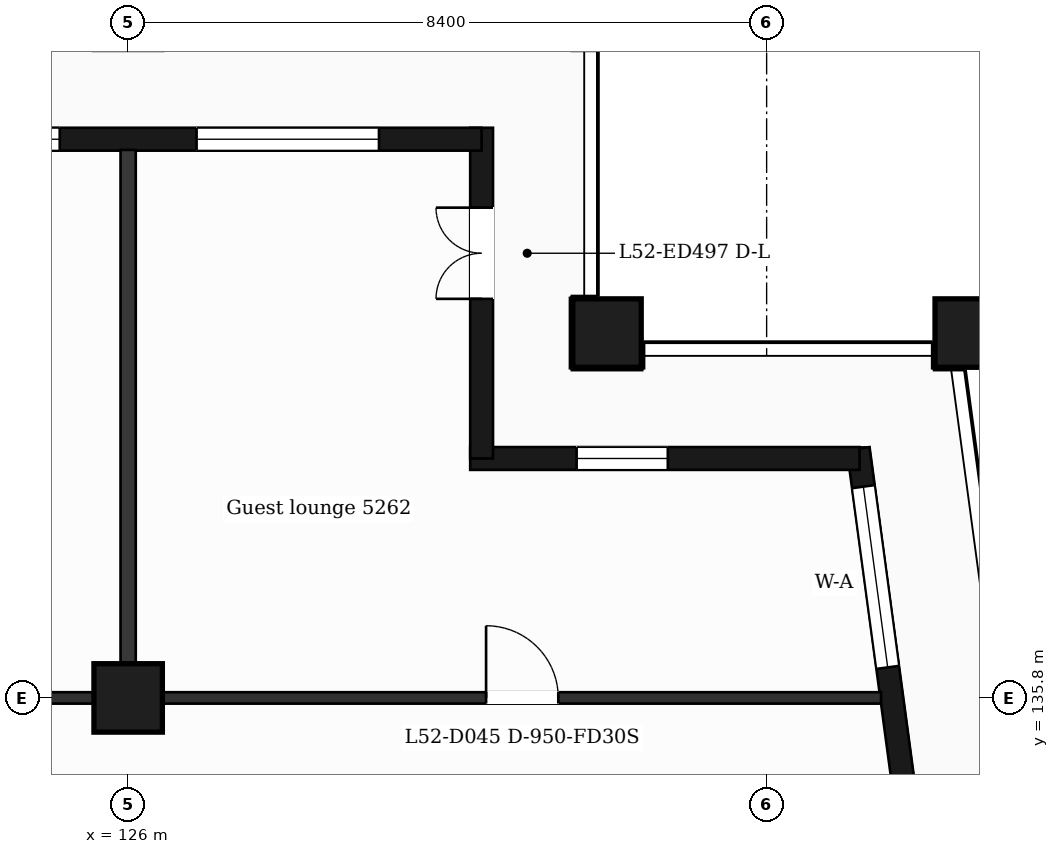
"""IFC4 building model, lengths in metres.
Left out: names, types, materials, properties, quantities, classifications, styles, units other than length and angle.
Written with IfcOpenShell. Run it as: python <this file> out.ifc"""

import sys

from ifc_helpers import new_model, si_unit, direction, frame, frame_2d, origin, origin_2d, place, context, subcontext, project, spatial, rectangle, extrude, element, fill, save


model = new_model("IFC4")
c1 = context("Model", 3, precision=1e-05, world=origin(), true_north=direction((0.0, 1.0)))
c2 = subcontext(c1, "Body", "Model", "MODEL_VIEW")
j1 = project(units=[si_unit("LENGTHUNIT", "METRE"), si_unit("PLANEANGLEUNIT", "RADIAN")], contexts=[c1])
p1 = place(None, origin())
s1 = spatial("IfcSite", under=j1, at=p1, CompositionType="ELEMENT")
p2 = place(p1, origin())
s2 = spatial("IfcBuilding", under=s1, at=p2, CompositionType="ELEMENT")
p3 = place(p2, frame((0.0, 0.0, 217.0)))
s3 = spatial("IfcBuildingStorey", under=s2, at=p3, CompositionType="ELEMENT", Elevation=217.0)
for number, where, z_axis, x_axis in (
    (1, (132.3, 140.6, 0.0), (0.0, 0.0, 1.0), (1.0, 0.0, 0.0)),
    (2, (137.065, 140.6, 0.0), (0.0, 0.0, 1.0), (1.0, 0.0, 0.0)),
    (3, (126.0, 135.8, 0.0), (0.0, 0.0, 1.0), (1.0, 0.0, 0.0)),
):
    element("IfcColumn", number, at=place(p3, frame(where, z_axis=z_axis, x_axis=x_axis)), inside=s3, PredefinedType="COLUMN", context=c2, shape_type="SweptSolid", body=[
        extrude(rectangle(XDim=0.9, YDim=0.9, at=origin_2d()), origin(), (0.0, 0.0, 1.0), 3.7),
    ])
p4 = place(p3, frame((136.504, 132.4, 0.0), z_axis=(0.0, 0.0, 1.0), x_axis=(-0.133399697462, 0.99106231929, 0.0)))
e4 = element("IfcWall", 4, at=p4, inside=s3, PredefinedType="SOLIDWALL", context=c2, shape_type="SweptSolid", body=[
    extrude(rectangle(XDim=6.74, YDim=0.3, at=frame_2d((3.37, 0.0))), origin(), (0.0, 0.0, 1.0), 3.38),
])
p5 = place(p4, frame((1.115, 0.0, 0.0)))
e5 = element("IfcOpeningElement", 5, at=p5, cuts=e4, PredefinedType="OPENING", context=c2, shape_type="SweptSolid", body=[
    extrude(rectangle(XDim=1.2, YDim=2.4, at=frame_2d((0.6, 1.2))), frame((0.0, 0.16, 0.0), z_axis=(0.0, -1.0, 0.0), x_axis=(1.0, 0.0, 0.0)), (0.0, 0.0, 1.0), 0.32),
])
p6 = place(p4, frame((3.835, 0.0, 0.9)))
e6 = element("IfcOpeningElement", 6, at=p6, cuts=e4, PredefinedType="OPENING", context=c2, shape_type="SweptSolid", body=[
    extrude(rectangle(XDim=2.4, YDim=2.1, at=frame_2d((1.2, 1.05))), frame((0.0, 0.16, 0.0), z_axis=(0.0, -1.0, 0.0), x_axis=(1.0, 0.0, 0.0)), (0.0, 0.0, 1.0), 0.32),
])
p7 = place(p3, frame((135.623, 138.95, 0.0), z_axis=(0.0, 0.0, 1.0), x_axis=(-1.0, 0.0, 0.0)))
e7 = element("IfcWall", 7, at=p7, inside=s3, PredefinedType="SOLIDWALL", context=c2, shape_type="SweptSolid", body=[
    extrude(rectangle(XDim=5.123, YDim=0.3, at=frame_2d((2.561, 0.0))), origin(), (0.0, 0.0, 1.0), 3.38),
])
p8 = place(p7, frame((2.523, 0.0, 0.9)))
e8 = element("IfcOpeningElement", 8, at=p8, cuts=e7, PredefinedType="OPENING", context=c2, shape_type="SweptSolid", body=[
    extrude(rectangle(XDim=1.2, YDim=2.1, at=frame_2d((0.6, 1.05))), frame((0.0, 0.16, 0.0), z_axis=(0.0, -1.0, 0.0), x_axis=(1.0, 0.0, 0.0)), (0.0, 0.0, 1.0), 0.32),
])
p9 = place(p3, frame((130.65, 138.95, 0.0), z_axis=(0.0, 0.0, 1.0), x_axis=(0.0, 1.0, 0.0)))
e9 = element("IfcWall", 9, at=p9, inside=s3, PredefinedType="SOLIDWALL", context=c2, shape_type="SweptSolid", body=[
    extrude(rectangle(XDim=4.35, YDim=0.3, at=frame_2d((2.175, 0.0))), origin(), (0.0, 0.0, 1.0), 3.38),
])
p10 = place(p9, frame((2.1, 0.0, 0.0)))
e10 = element("IfcOpeningElement", 10, at=p10, cuts=e9, PredefinedType="OPENING", context=c2, shape_type="SweptSolid", body=[
    extrude(rectangle(XDim=1.2, YDim=2.4, at=frame_2d((0.6, 1.2))), frame((0.0, 0.16, 0.0), z_axis=(0.0, -1.0, 0.0), x_axis=(1.0, 0.0, 0.0)), (0.0, 0.0, 1.0), 0.32),
])
p11 = place(p3, frame((130.65, 143.15, 0.0), z_axis=(0.0, 0.0, 1.0), x_axis=(-1.0, 0.0, 0.0)))
e11 = element("IfcWall", 11, at=p11, inside=s3, PredefinedType="SOLIDWALL", context=c2, shape_type="SweptSolid", body=[
    extrude(rectangle(XDim=16.35, YDim=0.3, at=frame_2d((8.175, 0.0))), origin(), (0.0, 0.0, 1.0), 3.38),
])
p12 = place(p11, frame((1.35, 0.0, 0.9)))
e12 = element("IfcOpeningElement", 12, at=p12, cuts=e11, PredefinedType="OPENING", context=c2, shape_type="SweptSolid", body=[
    extrude(rectangle(XDim=2.4, YDim=2.1, at=frame_2d((1.2, 1.05))), frame((0.0, 0.16, 0.0), z_axis=(0.0, -1.0, 0.0), x_axis=(1.0, 0.0, 0.0)), (0.0, 0.0, 1.0), 0.32),
])
p13 = place(p11, frame((5.55, 0.0, 0.9)))
e13 = element("IfcOpeningElement", 13, at=p13, cuts=e11, PredefinedType="OPENING", context=c2, shape_type="SweptSolid", body=[
    extrude(rectangle(XDim=2.4, YDim=2.1, at=frame_2d((1.2, 1.05))), frame((0.0, 0.16, 0.0), z_axis=(0.0, -1.0, 0.0), x_axis=(1.0, 0.0, 0.0)), (0.0, 0.0, 1.0), 0.32),
])
p14 = place(p11, frame((9.45, 0.0, 0.0)))
e14 = element("IfcOpeningElement", 14, at=p14, cuts=e11, PredefinedType="OPENING", context=c2, shape_type="SweptSolid", body=[
    extrude(rectangle(XDim=1.2, YDim=2.4, at=frame_2d((0.6, 1.2))), frame((0.0, 0.16, 0.0), z_axis=(0.0, -1.0, 0.0), x_axis=(1.0, 0.0, 0.0)), (0.0, 0.0, 1.0), 0.32),
])
p15 = place(p11, frame((11.25, 0.0, 0.9)))
e15 = element("IfcOpeningElement", 15, at=p15, cuts=e11, PredefinedType="OPENING", context=c2, shape_type="SweptSolid", body=[
    extrude(rectangle(XDim=1.2, YDim=2.1, at=frame_2d((0.6, 1.05))), frame((0.0, 0.16, 0.0), z_axis=(0.0, -1.0, 0.0), x_axis=(1.0, 0.0, 0.0)), (0.0, 0.0, 1.0), 0.32),
])
p16 = place(p11, frame((13.45, 0.0, 0.9)))
e16 = element("IfcOpeningElement", 16, at=p16, cuts=e11, PredefinedType="OPENING", context=c2, shape_type="SweptSolid", body=[
    extrude(rectangle(XDim=2.4, YDim=2.1, at=frame_2d((1.2, 1.05))), frame((0.0, 0.16, 0.0), z_axis=(0.0, -1.0, 0.0), x_axis=(1.0, 0.0, 0.0)), (0.0, 0.0, 1.0), 0.32),
])
p17 = place(p3, frame((90.895, 135.8, 0.0), z_axis=(0.0, 0.0, 1.0), x_axis=(1.0, 0.0, 0.0)))
e17 = element("IfcWall", 17, at=p17, inside=s3, PredefinedType="PARTITIONING", context=c2, shape_type="SweptSolid", body=[
    extrude(rectangle(XDim=45.011, YDim=0.15, at=frame_2d((22.505, 0.0))), origin(), (0.0, 0.0, 1.0), 3.38),
])
p18 = place(p17, frame((6.906, 0.0, 0.0)))
e18 = element("IfcOpeningElement", 18, at=p18, cuts=e17, PredefinedType="OPENING", context=c2, shape_type="SweptSolid", body=[
    extrude(rectangle(XDim=1.0, YDim=2.1, at=frame_2d((0.5, 1.05))), frame((0.0, 0.085, 0.0), z_axis=(0.0, -1.0, 0.0), x_axis=(1.0, 0.0, 0.0)), (0.0, 0.0, 1.0), 0.17),
])
p19 = place(p17, frame((11.531, 0.0, 0.0)))
e19 = element("IfcOpeningElement", 19, at=p19, cuts=e17, PredefinedType="OPENING", context=c2, shape_type="SweptSolid", body=[
    extrude(rectangle(XDim=0.95, YDim=2.1, at=frame_2d((0.475, 1.05))), frame((0.0, 0.085, 0.0), z_axis=(0.0, -1.0, 0.0), x_axis=(1.0, 0.0, 0.0)), (0.0, 0.0, 1.0), 0.17),
])
p20 = place(p17, frame((16.667, 0.0, 0.0)))
e20 = element("IfcOpeningElement", 20, at=p20, cuts=e17, PredefinedType="OPENING", context=c2, shape_type="SweptSolid", body=[
    extrude(rectangle(XDim=0.95, YDim=2.1, at=frame_2d((0.475, 1.05))), frame((0.0, 0.085, 0.0), z_axis=(0.0, -1.0, 0.0), x_axis=(1.0, 0.0, 0.0)), (0.0, 0.0, 1.0), 0.17),
])
p21 = place(p17, frame((21.281, 0.0, 0.0)))
e21 = element("IfcOpeningElement", 21, at=p21, cuts=e17, PredefinedType="OPENING", context=c2, shape_type="SweptSolid", body=[
    extrude(rectangle(XDim=0.95, YDim=2.1, at=frame_2d((0.475, 1.05))), frame((0.0, 0.085, 0.0), z_axis=(0.0, -1.0, 0.0), x_axis=(1.0, 0.0, 0.0)), (0.0, 0.0, 1.0), 0.17),
])
p22 = place(p17, frame((28.73, 0.0, 0.0)))
e22 = element("IfcOpeningElement", 22, at=p22, cuts=e17, PredefinedType="OPENING", context=c2, shape_type="SweptSolid", body=[
    extrude(rectangle(XDim=1.0, YDim=2.1, at=frame_2d((0.5, 1.05))), frame((0.0, 0.085, 0.0), z_axis=(0.0, -1.0, 0.0), x_axis=(1.0, 0.0, 0.0)), (0.0, 0.0, 1.0), 0.17),
])
p23 = place(p17, frame((39.814, 0.0, 0.0)))
e23 = element("IfcOpeningElement", 23, at=p23, cuts=e17, PredefinedType="OPENING", context=c2, shape_type="SweptSolid", body=[
    extrude(rectangle(XDim=0.95, YDim=2.1, at=frame_2d((0.475, 1.05))), frame((0.0, 0.085, 0.0), z_axis=(0.0, -1.0, 0.0), x_axis=(1.0, 0.0, 0.0)), (0.0, 0.0, 1.0), 0.17),
])
p24 = place(p3, frame((126.0, 135.875, 0.0), z_axis=(0.0, 0.0, 1.0), x_axis=(0.0, 1.0, 0.0)))
e24 = element("IfcWall", 24, at=p24, inside=s3, PredefinedType="PARTITIONING", context=c2, shape_type="SweptSolid", body=[
    extrude(rectangle(XDim=7.135, YDim=0.2, at=frame_2d((3.567, 0.0))), origin(), (0.0, 0.0, 1.0), 3.38),
])
p25 = place(p6, origin())
e25 = element("IfcWindow", 25, at=p25, inside=s3, PartitioningType="SINGLE_PANEL", PredefinedType="WINDOW", context=c2, shape_type="SweptSolid", body=[
    extrude(rectangle(XDim=2.4, YDim=2.1, at=frame_2d((1.2, 1.05))), frame((0.0, 0.03, 0.0), z_axis=(0.0, -1.0, 0.0), x_axis=(1.0, 0.0, 0.0)), (0.0, 0.0, 1.0), 0.06),
])
fill(e6, e25)
p26 = place(p8, origin())
e26 = element("IfcWindow", 26, at=p26, inside=s3, PartitioningType="SINGLE_PANEL", PredefinedType="WINDOW", context=c2, shape_type="SweptSolid", body=[
    extrude(rectangle(XDim=1.2, YDim=2.1, at=frame_2d((0.6, 1.05))), frame((0.0, 0.03, 0.0), z_axis=(0.0, -1.0, 0.0), x_axis=(1.0, 0.0, 0.0)), (0.0, 0.0, 1.0), 0.06),
])
fill(e8, e26)
p27 = place(p10, origin())
e27 = element("IfcDoor", 27, at=p27, inside=s3, OperationType="DOUBLE_DOOR_SINGLE_SWING", PredefinedType="DOOR", context=c2, shape_type="SweptSolid", body=[
    extrude(rectangle(XDim=1.2, YDim=2.4, at=frame_2d((0.6, 1.2))), frame((0.0, 0.025, 0.0), z_axis=(0.0, -1.0, 0.0), x_axis=(1.0, 0.0, 0.0)), (0.0, 0.0, 1.0), 0.05),
])
fill(e10, e27)
p28 = place(p12, origin())
e28 = element("IfcWindow", 28, at=p28, inside=s3, PartitioningType="SINGLE_PANEL", PredefinedType="WINDOW", context=c2, shape_type="SweptSolid", body=[
    extrude(rectangle(XDim=2.4, YDim=2.1, at=frame_2d((1.2, 1.05))), frame((0.0, 0.03, 0.0), z_axis=(0.0, -1.0, 0.0), x_axis=(1.0, 0.0, 0.0)), (0.0, 0.0, 1.0), 0.06),
])
fill(e12, e28)
p29 = place(p13, origin())
e29 = element("IfcWindow", 29, at=p29, inside=s3, PartitioningType="SINGLE_PANEL", PredefinedType="WINDOW", context=c2, shape_type="SweptSolid", body=[
    extrude(rectangle(XDim=2.4, YDim=2.1, at=frame_2d((1.2, 1.05))), frame((0.0, 0.03, 0.0), z_axis=(0.0, -1.0, 0.0), x_axis=(1.0, 0.0, 0.0)), (0.0, 0.0, 1.0), 0.06),
])
fill(e13, e29)
p30 = place(p23, origin())
e30 = element("IfcDoor", 30, at=p30, inside=s3, OperationType="SINGLE_SWING_LEFT", PredefinedType="DOOR", context=c2, shape_type="SweptSolid", body=[
    extrude(rectangle(XDim=0.95, YDim=2.1, at=frame_2d((0.475, 1.05))), frame((0.0, 0.025, 0.0), z_axis=(0.0, -1.0, 0.0), x_axis=(1.0, 0.0, 0.0)), (0.0, 0.0, 1.0), 0.05),
])
fill(e23, e30)
save(model, sys.argv[1])
